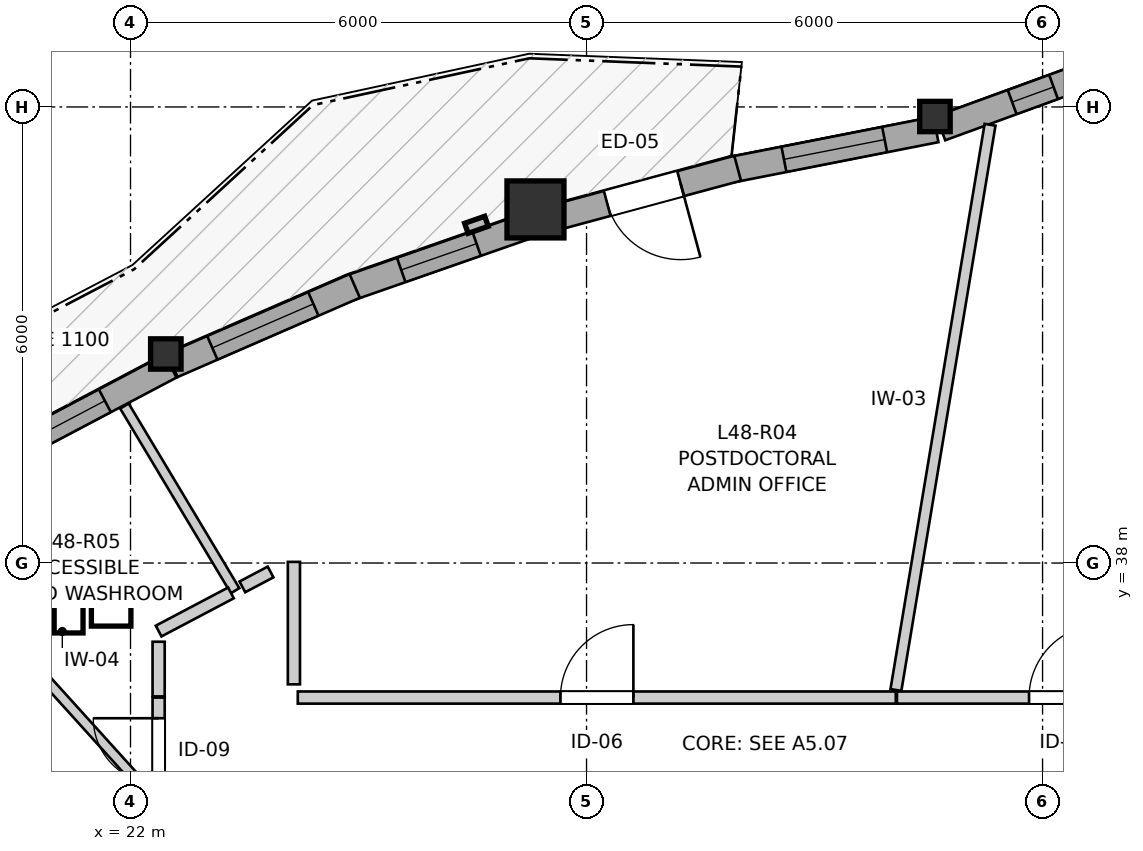
"""IFC4 building model, lengths in metres.
Left out: names, types, materials, properties, quantities, classifications, styles, units other than length and angle.
Written with IfcOpenShell. Run it as: python <this file> out.ifc"""

import sys

from ifc_helpers import new_model, si_unit, direction, frame, frame_2d, origin, origin_2d, place, context, subcontext, project, spatial, rectangle, i_section, extrude, source, transform, mapped, element, fill, save


model = new_model("IFC4")
c1 = context("Model", 3, precision=1e-05, world=origin(), true_north=direction((0.0, 1.0)))
c2 = subcontext(c1, "Body", "Model", "MODEL_VIEW")
j1 = project(units=[si_unit("LENGTHUNIT", "METRE"), si_unit("PLANEANGLEUNIT", "RADIAN")], contexts=[c1])
p1 = place(None, origin())
s1 = spatial("IfcSite", under=j1, at=p1, CompositionType="ELEMENT")
p2 = place(p1, origin())
s2 = spatial("IfcBuilding", under=s1, at=p2, CompositionType="ELEMENT")
p3 = place(p2, frame((0.0, 0.0, 161.8)))
s3 = spatial("IfcBuildingStorey", under=s2, at=p3, CompositionType="ELEMENT", Elevation=161.8)
m1 = source(origin(), c2, "Body", "SweptSolid", [
    extrude(i_section(OverallWidth=0.401, OverallDepth=0.399, WebThickness=0.023, FlangeThickness=0.036, FilletRadius=0.015, at=origin_2d()), origin(), (0.0, 0.0, 1.0), 2.95),
])
p4 = place(p3, frame((32.584, 43.874, 0.0), z_axis=(0.0, 0.0, 1.0), x_axis=(1.0, 0.0, 0.0)))
e1 = element("IfcColumn", 1, at=p4, inside=s3, PredefinedType="PILASTER", context=c2, shape_type="MappedRepresentation", body=[
    mapped(m1, transform((0.0, 0.0, 0.0), x_axis=(1.0, 0.0, 0.0), y_axis=(0.0, 1.0, 0.0), z_axis=(0.0, 0.0, 1.0), scale=1.0)),
])
m2 = source(origin(), c2, "Body", "SweptSolid", [
    extrude(rectangle(XDim=0.75, YDim=0.75, at=origin_2d()), origin(), (0.0, 0.0, 1.0), 2.95),
])
p5 = place(p3, frame((27.328, 42.652, 0.0), z_axis=(0.0, 0.0, 1.0), x_axis=(1.0, 0.0, 0.0)))
e2 = element("IfcColumn", 2, at=p5, inside=s3, PredefinedType="COLUMN", context=c2, shape_type="MappedRepresentation", body=[
    mapped(m2, transform((0.0, 0.0, 0.0), x_axis=(1.0, 0.0, 0.0), y_axis=(0.0, 1.0, 0.0), z_axis=(0.0, 0.0, 1.0), scale=1.0)),
])
p6 = place(p3, frame((22.465, 40.75, 0.0), z_axis=(0.0, 0.0, 1.0), x_axis=(1.0, 0.0, 0.0)))
e3 = element("IfcColumn", 3, at=p6, inside=s3, PredefinedType="PILASTER", context=c2, shape_type="MappedRepresentation", body=[
    mapped(m1, transform((0.0, 0.0, 0.0), x_axis=(1.0, 0.0, 0.0), y_axis=(0.0, 1.0, 0.0), z_axis=(0.0, 0.0, 1.0), scale=1.0)),
])
p7 = place(p3, frame((34.562, 44.415, 0.0), z_axis=(0.0, 0.0, 1.0), x_axis=(-0.939426417976, -0.342750645819, 0.0)))
e4 = element("IfcWall", 4, at=p7, inside=s3, PredefinedType="SOLIDWALL", context=c2, shape_type="SweptSolid", body=[
    extrude(rectangle(XDim=2.023, YDim=0.34, at=frame_2d((1.011, 0.0))), origin(), (0.0, 0.0, 1.0), 2.53),
])
p8 = place(p7, frame((0.444, 0.0, 0.82)))
e5 = element("IfcOpeningElement", 5, at=p8, cuts=e4, PredefinedType="OPENING", context=c2, shape_type="SweptSolid", body=[
    extrude(rectangle(XDim=0.58, YDim=1.35, at=frame_2d((0.29, 0.675))), frame((0.0, 0.18, 0.0), z_axis=(0.0, -1.0, 0.0), x_axis=(1.0, 0.0, 0.0)), (0.0, 0.0, 1.0), 0.36),
])
p9 = place(p3, frame((32.597, 43.704, 0.0), z_axis=(0.0, 0.0, 1.0), x_axis=(-0.981214876679, -0.192918028667, 0.0)))
e6 = element("IfcWall", 6, at=p9, inside=s3, PredefinedType="SOLIDWALL", context=c2, shape_type="SweptSolid", body=[
    extrude(rectangle(XDim=2.746, YDim=0.34, at=frame_2d((1.373, 0.0))), origin(), (0.0, 0.0, 1.0), 2.53),
])
p10 = place(p9, frame((0.688, 0.0, 0.82)))
e7 = element("IfcOpeningElement", 7, at=p10, cuts=e6, PredefinedType="OPENING", context=c2, shape_type="SweptSolid", body=[
    extrude(rectangle(XDim=1.35, YDim=1.45, at=frame_2d((0.675, 0.725))), frame((0.0, 0.18, 0.0), z_axis=(0.0, -1.0, 0.0), x_axis=(1.0, 0.0, 0.0)), (0.0, 0.0, 1.0), 0.36),
])
p11 = place(p3, frame((29.988, 43.194, 0.0), z_axis=(0.0, 0.0, 1.0), x_axis=(-0.965459623591, -0.26055271101, 0.0)))
e8 = element("IfcWall", 8, at=p11, inside=s3, PredefinedType="SOLIDWALL", context=c2, shape_type="SweptSolid", body=[
    extrude(rectangle(XDim=2.554, YDim=0.34, at=frame_2d((1.277, 0.0))), origin(), (0.0, 0.0, 1.0), 2.53),
])
p12 = place(p11, frame((0.777, 0.0, 0.0)))
e9 = element("IfcOpeningElement", 9, at=p12, cuts=e8, PredefinedType="OPENING", context=c2, shape_type="SweptSolid", body=[
    extrude(rectangle(XDim=1.0, YDim=2.1, at=frame_2d((0.5, 1.05))), frame((0.0, 0.18, 0.0), z_axis=(0.0, -1.0, 0.0), x_axis=(1.0, 0.0, 0.0)), (0.0, 0.0, 1.0), 0.36),
])
p13 = place(p3, frame((27.238, 42.44, 0.0), z_axis=(0.0, 0.0, 1.0), x_axis=(-0.944135459374, -0.329557634341, 0.0)))
e10 = element("IfcWall", 10, at=p13, inside=s3, PredefinedType="SOLIDWALL", context=c2, shape_type="SweptSolid", body=[
    extrude(rectangle(XDim=2.51, YDim=0.34, at=frame_2d((1.255, 0.0))), origin(), (0.0, 0.0, 1.0), 2.53),
])
p14 = place(p13, frame((0.725, 0.0, 0.82)))
e11 = element("IfcOpeningElement", 11, at=p14, cuts=e10, PredefinedType="OPENING", context=c2, shape_type="SweptSolid", body=[
    extrude(rectangle(XDim=1.05, YDim=1.45, at=frame_2d((0.525, 0.725))), frame((0.0, 0.18, 0.0), z_axis=(0.0, -1.0, 0.0), x_axis=(1.0, 0.0, 0.0)), (0.0, 0.0, 1.0), 0.36),
])
p15 = place(p3, frame((24.95, 41.645, 0.0), z_axis=(0.0, 0.0, 1.0), x_axis=(-0.917090826553, -0.398678336322, 0.0)))
e12 = element("IfcWall", 12, at=p15, inside=s3, PredefinedType="SOLIDWALL", context=c2, shape_type="SweptSolid", body=[
    extrude(rectangle(XDim=2.616, YDim=0.34, at=frame_2d((1.308, 0.0))), origin(), (0.0, 0.0, 1.0), 2.53),
])
p16 = place(p15, frame((0.593, 0.0, 0.82)))
e13 = element("IfcOpeningElement", 13, at=p16, cuts=e12, PredefinedType="OPENING", context=c2, shape_type="SweptSolid", body=[
    extrude(rectangle(XDim=1.45, YDim=1.25, at=frame_2d((0.725, 0.625))), frame((0.0, 0.18, 0.0), z_axis=(0.0, -1.0, 0.0), x_axis=(1.0, 0.0, 0.0)), (0.0, 0.0, 1.0), 0.36),
])
p17 = place(p3, frame((22.526, 40.591, 0.0), z_axis=(0.0, 0.0, 1.0), x_axis=(-0.884394438343, -0.46674026763, 0.0)))
e14 = element("IfcWall", 14, at=p17, inside=s3, PredefinedType="SOLIDWALL", context=c2, shape_type="SweptSolid", body=[
    extrude(rectangle(XDim=2.601, YDim=0.34, at=frame_2d((1.301, 0.0))), origin(), (0.0, 0.0, 1.0), 2.53),
])
p18 = place(p17, frame((0.977, 0.0, 0.82)))
e15 = element("IfcOpeningElement", 15, at=p18, cuts=e14, PredefinedType="OPENING", context=c2, shape_type="SweptSolid", body=[
    extrude(rectangle(XDim=1.35, YDim=1.45, at=frame_2d((0.675, 0.725))), frame((0.0, 0.18, 0.0), z_axis=(0.0, -1.0, 0.0), x_axis=(1.0, 0.0, 0.0)), (0.0, 0.0, 1.0), 0.36),
])
p19 = place(p3, frame((24.201, 36.23, 0.0), z_axis=(0.0, 0.0, 1.0), x_axis=(1.0, 0.0, 0.0)))
e16 = element("IfcWall", 16, at=p19, inside=s3, PredefinedType="PARTITIONING", context=c2, shape_type="SweptSolid", body=[
    extrude(rectangle(XDim=7.868, YDim=0.16, at=frame_2d((3.934, 0.0))), origin(), (0.0, 0.0, 1.0), 2.95),
])
p20 = place(p19, frame((3.456, 0.0, 0.0)))
e17 = element("IfcOpeningElement", 17, at=p20, cuts=e16, PredefinedType="OPENING", context=c2, shape_type="SweptSolid", body=[
    extrude(rectangle(XDim=0.96, YDim=2.1, at=frame_2d((0.48, 1.05))), frame((0.0, 0.09, 0.0), z_axis=(0.0, -1.0, 0.0), x_axis=(1.0, 0.0, 0.0)), (0.0, 0.0, 1.0), 0.18),
])
p21 = place(p3, frame((32.084, 36.23, 0.0), z_axis=(0.0, 0.0, 1.0), x_axis=(1.0, 0.0, 0.0)))
e18 = element("IfcWall", 18, at=p21, inside=s3, PredefinedType="PARTITIONING", context=c2, shape_type="SweptSolid", body=[
    extrude(rectangle(XDim=4.466, YDim=0.16, at=frame_2d((2.233, 0.0))), origin(), (0.0, 0.0, 1.0), 2.588),
])
p22 = place(p21, frame((1.738, 0.0, 0.0)))
e19 = element("IfcOpeningElement", 19, at=p22, cuts=e18, PredefinedType="OPENING", context=c2, shape_type="SweptSolid", body=[
    extrude(rectangle(XDim=0.96, YDim=2.1, at=frame_2d((0.48, 1.05))), frame((0.0, 0.09, 0.0), z_axis=(0.0, -1.0, 0.0), x_axis=(1.0, 0.0, 0.0)), (0.0, 0.0, 1.0), 0.18),
])
p23 = place(p3, frame((22.37, 34.803, 0.0), z_axis=(0.0, 0.0, 1.0), x_axis=(0.0, 1.0, 0.0)))
e20 = element("IfcWall", 20, at=p23, inside=s3, PredefinedType="PARTITIONING", context=c2, shape_type="SweptSolid", body=[
    extrude(rectangle(XDim=1.427, YDim=0.16, at=frame_2d((0.713, 0.0))), origin(), (0.0, 0.0, 1.0), 2.95),
])
p24 = place(p23, frame((0.295, 0.0, 0.0)))
e21 = element("IfcOpeningElement", 21, at=p24, cuts=e20, PredefinedType="OPENING", context=c2, shape_type="SweptSolid", body=[
    extrude(rectangle(XDim=0.86, YDim=2.05, at=frame_2d((0.43, 1.025))), frame((0.0, 0.09, 0.0), z_axis=(0.0, -1.0, 0.0), x_axis=(1.0, 0.0, 0.0)), (0.0, 0.0, 1.0), 0.18),
])
p25 = place(p3, frame((32.071, 36.33, 0.0), z_axis=(0.0, 0.0, 1.0), x_axis=(0.164299199522, 0.986410549942, 0.0)))
e22 = element("IfcWall", 22, at=p25, inside=s3, PredefinedType="PARTITIONING", context=c2, shape_type="SweptSolid", body=[
    extrude(rectangle(XDim=7.538, YDim=0.145, at=frame_2d((3.769, 0.0))), origin(), (0.0, 0.0, 1.0), 2.95),
])
p26 = place(p3, frame((17.028, 37.0, 0.0), z_axis=(0.0, 0.0, 1.0), x_axis=(0.771119105053, -0.636690918596, 0.0)))
e23 = element("IfcWall", 23, at=p26, inside=s3, PredefinedType="PARTITIONING", context=c2, shape_type="SweptSolid", body=[
    extrude(rectangle(XDim=6.756, YDim=0.145, at=frame_2d((3.378, 0.0))), origin(), (0.0, 0.0, 1.0), 2.95),
])
p27 = place(p3, frame((19.101, 38.441, 0.0), z_axis=(0.0, 0.0, 1.0), x_axis=(0.670702711046, -0.741726279295, 0.0)))
e24 = element("IfcWall", 24, at=p27, inside=s3, PredefinedType="PARTITIONING", context=c2, shape_type="SweptSolid", body=[
    extrude(rectangle(XDim=4.675, YDim=0.13, at=frame_2d((2.337, 0.0))), origin(), (0.0, 0.0, 1.0), 2.95),
])
p28 = place(p3, frame((21.92, 40.065, 0.0), z_axis=(0.0, 0.0, 1.0), x_axis=(0.514051974364, -0.857759038223, 0.0)))
e25 = element("IfcWall", 25, at=p28, inside=s3, PredefinedType="PARTITIONING", context=c2, shape_type="SweptSolid", body=[
    extrude(rectangle(XDim=2.832, YDim=0.13, at=frame_2d((1.416, 0.0))), origin(), (0.0, 0.0, 1.0), 2.95),
])
p29 = place(p3, frame((24.15, 36.404, 0.0), z_axis=(0.0, 0.0, 1.0), x_axis=(0.0, 1.0, 0.0)))
e26 = element("IfcWall", 26, at=p29, inside=s3, PredefinedType="PARTITIONING", context=c2, shape_type="SweptSolid", body=[
    extrude(rectangle(XDim=1.611, YDim=0.16, at=frame_2d((0.805, 0.0))), origin(), (0.0, 0.0, 1.0), 2.95),
])
p30 = place(p3, frame((22.37, 37.105, 0.0), z_axis=(0.0, 0.0, 1.0), x_axis=(0.884455008011, 0.466625480234, 0.0)))
e27 = element("IfcWall", 27, at=p30, inside=s3, PredefinedType="PARTITIONING", context=c2, shape_type="SweptSolid", body=[
    extrude(rectangle(XDim=1.076, YDim=0.16, at=frame_2d((0.538, 0.0))), origin(), (0.0, 0.0, 1.0), 2.558),
])
p31 = place(p3, frame((22.37, 36.245, 0.0), z_axis=(0.0, 0.0, 1.0), x_axis=(0.0, 1.0, 0.0)))
e28 = element("IfcWall", 28, at=p31, inside=s3, PredefinedType="PARTITIONING", context=c2, shape_type="SweptSolid", body=[
    extrude(rectangle(XDim=0.719, YDim=0.16, at=frame_2d((0.36, 0.0))), origin(), (0.0, 0.0, 1.0), 2.95),
])
p32 = place(p3, frame((23.472, 37.686, 0.0), z_axis=(0.0, 0.0, 1.0), x_axis=(0.884564737935, 0.466417435782, 0.0)))
e29 = element("IfcWall", 29, at=p32, inside=s3, PredefinedType="PARTITIONING", context=c2, shape_type="SweptSolid", body=[
    extrude(rectangle(XDim=0.42, YDim=0.16, at=frame_2d((0.21, 0.0))), origin(), (0.0, 0.0, 1.0), 2.558),
])
m3 = source(origin(), c2, "Body", "SweptSolid", [
    extrude(rectangle(XDim=0.58, YDim=1.35, at=frame_2d((0.29, 0.675))), frame((0.0, 0.03, 0.0), z_axis=(0.0, -1.0, 0.0), x_axis=(1.0, 0.0, 0.0)), (0.0, 0.0, 1.0), 0.06),
])
p33 = place(p8, origin())
e30 = element("IfcWindow", 30, at=p33, inside=s3, PartitioningType="SINGLE_PANEL", PredefinedType="WINDOW", context=c2, shape_type="MappedRepresentation", body=[
    mapped(m3, transform((0.0, 0.0, 0.0), x_axis=(1.0, 0.0, 0.0), y_axis=(0.0, 1.0, 0.0), z_axis=(0.0, 0.0, 1.0), scale=1.0)),
])
fill(e5, e30)
m4 = source(origin(), c2, "Body", "SweptSolid", [
    extrude(rectangle(XDim=1.35, YDim=1.45, at=frame_2d((0.675, 0.725))), frame((0.0, 0.03, 0.0), z_axis=(0.0, -1.0, 0.0), x_axis=(1.0, 0.0, 0.0)), (0.0, 0.0, 1.0), 0.06),
])
p34 = place(p10, origin())
e31 = element("IfcWindow", 31, at=p34, inside=s3, PartitioningType="SINGLE_PANEL", PredefinedType="WINDOW", context=c2, shape_type="MappedRepresentation", body=[
    mapped(m4, transform((0.0, 0.0, 0.0), x_axis=(1.0, 0.0, 0.0), y_axis=(0.0, 1.0, 0.0), z_axis=(0.0, 0.0, 1.0), scale=1.0)),
])
fill(e7, e31)
m5 = source(origin(), c2, "Body", "SweptSolid", [
    extrude(rectangle(XDim=1.05, YDim=1.45, at=frame_2d((0.525, 0.725))), frame((0.0, 0.03, 0.0), z_axis=(0.0, -1.0, 0.0), x_axis=(1.0, 0.0, 0.0)), (0.0, 0.0, 1.0), 0.06),
])
p35 = place(p14, origin())
e32 = element("IfcWindow", 32, at=p35, inside=s3, PartitioningType="SINGLE_PANEL", PredefinedType="WINDOW", context=c2, shape_type="MappedRepresentation", body=[
    mapped(m5, transform((0.0, 0.0, 0.0), x_axis=(1.0, 0.0, 0.0), y_axis=(0.0, 1.0, 0.0), z_axis=(0.0, 0.0, 1.0), scale=1.0)),
])
fill(e11, e32)
m6 = source(origin(), c2, "Body", "SweptSolid", [
    extrude(rectangle(XDim=1.45, YDim=1.25, at=frame_2d((0.725, 0.625))), frame((0.0, 0.03, 0.0), z_axis=(0.0, -1.0, 0.0), x_axis=(1.0, 0.0, 0.0)), (0.0, 0.0, 1.0), 0.06),
])
p36 = place(p16, origin())
e33 = element("IfcWindow", 33, at=p36, inside=s3, PartitioningType="SINGLE_PANEL", PredefinedType="WINDOW", context=c2, shape_type="MappedRepresentation", body=[
    mapped(m6, transform((0.0, 0.0, 0.0), x_axis=(1.0, 0.0, 0.0), y_axis=(0.0, 1.0, 0.0), z_axis=(0.0, 0.0, 1.0), scale=1.0)),
])
fill(e13, e33)
p37 = place(p18, origin())
e34 = element("IfcWindow", 34, at=p37, inside=s3, PartitioningType="SINGLE_PANEL", PredefinedType="WINDOW", context=c2, shape_type="MappedRepresentation", body=[
    mapped(m4, transform((0.0, 0.0, 0.0), x_axis=(1.0, 0.0, 0.0), y_axis=(0.0, 1.0, 0.0), z_axis=(0.0, 0.0, 1.0), scale=1.0)),
])
fill(e15, e34)
m7 = source(origin(), c2, "Body", "SweptSolid", [
    extrude(rectangle(XDim=1.0, YDim=2.1, at=frame_2d((0.5, 1.05))), frame((0.0, 0.025, 0.0), z_axis=(0.0, -1.0, 0.0), x_axis=(1.0, 0.0, 0.0)), (0.0, 0.0, 1.0), 0.05),
])
p38 = place(p12, origin())
e35 = element("IfcDoor", 35, at=p38, inside=s3, OperationType="SINGLE_SWING_LEFT", PredefinedType="DOOR", context=c2, shape_type="MappedRepresentation", body=[
    mapped(m7, transform((0.0, 0.0, 0.0), x_axis=(1.0, 0.0, 0.0), y_axis=(0.0, 1.0, 0.0), z_axis=(0.0, 0.0, 1.0), scale=1.0)),
])
fill(e9, e35)
m8 = source(origin(), c2, "Body", "SweptSolid", [
    extrude(rectangle(XDim=0.96, YDim=2.1, at=frame_2d((0.48, 1.05))), frame((0.0, 0.025, 0.0), z_axis=(0.0, -1.0, 0.0), x_axis=(1.0, 0.0, 0.0)), (0.0, 0.0, 1.0), 0.05),
])
p39 = place(p20, origin())
e36 = element("IfcDoor", 36, at=p39, inside=s3, OperationType="SINGLE_SWING_RIGHT", PredefinedType="DOOR", context=c2, shape_type="MappedRepresentation", body=[
    mapped(m8, transform((0.0, 0.0, 0.0), x_axis=(1.0, 0.0, 0.0), y_axis=(0.0, 1.0, 0.0), z_axis=(0.0, 0.0, 1.0), scale=1.0)),
])
fill(e17, e36)
p40 = place(p22, origin())
e37 = element("IfcDoor", 37, at=p40, inside=s3, OperationType="SINGLE_SWING_RIGHT", PredefinedType="DOOR", context=c2, shape_type="MappedRepresentation", body=[
    mapped(m8, transform((0.0, 0.0, 0.0), x_axis=(1.0, 0.0, 0.0), y_axis=(0.0, 1.0, 0.0), z_axis=(0.0, 0.0, 1.0), scale=1.0)),
])
fill(e19, e37)
m9 = source(origin(), c2, "Body", "SweptSolid", [
    extrude(rectangle(XDim=0.86, YDim=2.05, at=frame_2d((0.43, 1.025))), frame((0.0, 0.025, 0.0), z_axis=(0.0, -1.0, 0.0), x_axis=(1.0, 0.0, 0.0)), (0.0, 0.0, 1.0), 0.05),
])
p41 = place(p24, origin())
e38 = element("IfcDoor", 38, at=p41, inside=s3, OperationType="SINGLE_SWING_RIGHT", PredefinedType="DOOR", context=c2, shape_type="MappedRepresentation", body=[
    mapped(m9, transform((0.0, 0.0, 0.0), x_axis=(1.0, 0.0, 0.0), y_axis=(0.0, 1.0, 0.0), z_axis=(0.0, 0.0, 1.0), scale=1.0)),
])
fill(e21, e38)
save(model, sys.argv[1])
